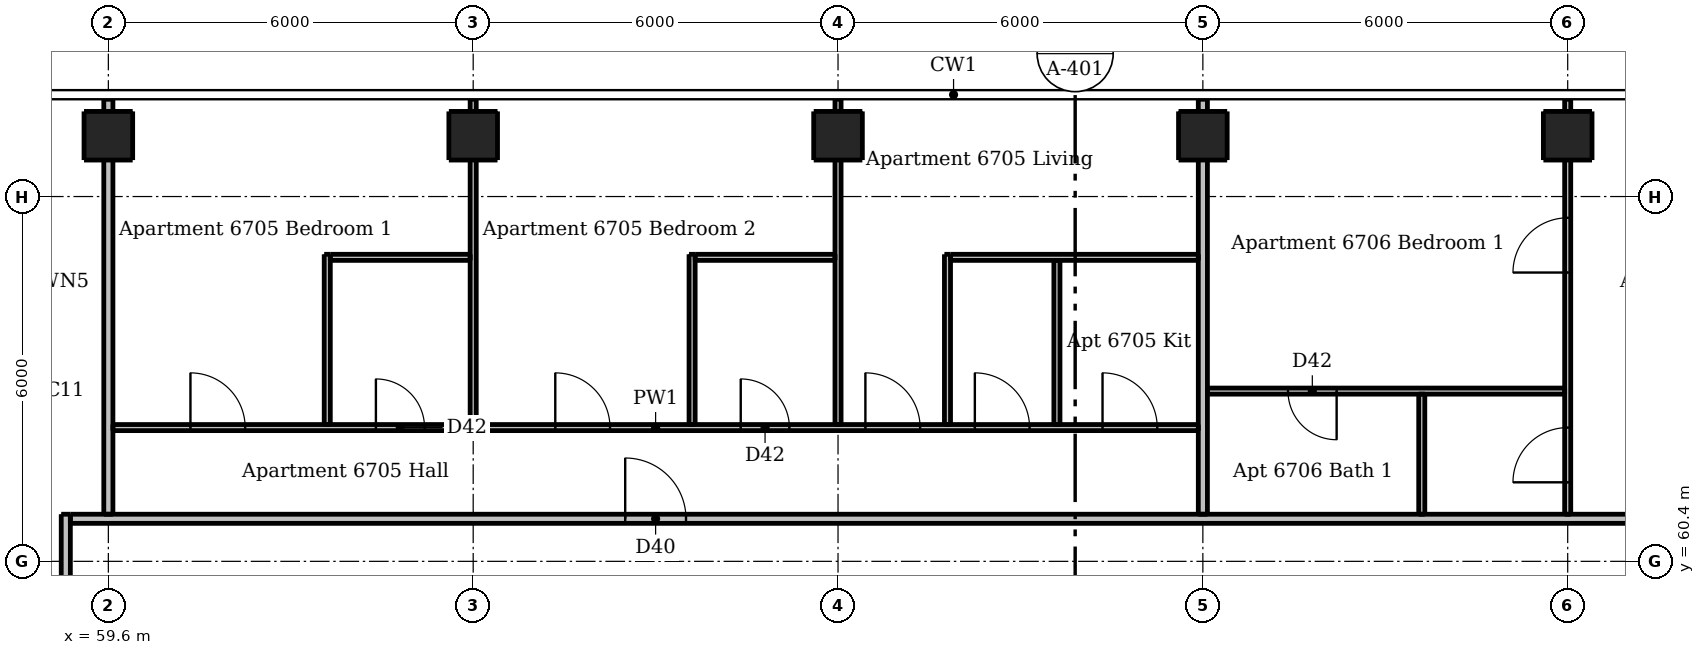
"""IFC4 building model, lengths in metres.
Left out: names, types, materials, properties, quantities, classifications, styles, units other than length and angle.
Written with IfcOpenShell. Run it as: python <this file> out.ifc"""

import sys

from ifc_helpers import new_model, si_unit, direction, frame, frame_2d, origin, origin_2d, place, context, subcontext, project, spatial, rectangle, extrude, element, fill, save


model = new_model("IFC4")
c1 = context("Model", 3, precision=1e-05, world=origin(), true_north=direction((0.0, 1.0)))
c2 = subcontext(c1, "Body", "Model", "MODEL_VIEW")
j1 = project(units=[si_unit("LENGTHUNIT", "METRE"), si_unit("PLANEANGLEUNIT", "RADIAN")], contexts=[c1])
p1 = place(None, origin())
s1 = spatial("IfcSite", under=j1, at=p1, CompositionType="ELEMENT")
p2 = place(p1, origin())
s2 = spatial("IfcBuilding", under=s1, at=p2, CompositionType="ELEMENT")
p3 = place(p2, frame((0.0, 0.0, 252.1)))
s3 = spatial("IfcBuildingStorey", under=s2, at=p3, CompositionType="ELEMENT", Elevation=252.1)
for number, where, z_axis, x_axis in (
    (1, (59.6, 67.4, 0.0), (0.0, 0.0, 1.0), (1.0, 0.0, 0.0)),
    (2, (65.6, 67.4, 0.0), (0.0, 0.0, 1.0), (1.0, 0.0, 0.0)),
    (3, (71.6, 67.4, 0.0), (0.0, 0.0, 1.0), (1.0, 0.0, 0.0)),
    (4, (77.6, 67.4, 0.0), (0.0, 0.0, 1.0), (1.0, 0.0, 0.0)),
    (5, (83.6, 67.4, 0.0), (0.0, 0.0, 1.0), (1.0, 0.0, 0.0)),
):
    element("IfcColumn", number, at=place(p3, frame(where, z_axis=z_axis, x_axis=x_axis)), inside=s3, PredefinedType="COLUMN", context=c2, shape_type="SweptSolid", body=[
        extrude(rectangle(XDim=0.8, YDim=0.8, at=origin_2d()), origin(), (0.0, 0.0, 1.0), 3.05),
    ])
p4 = place(p3, frame((63.2, 62.65, 0.0), z_axis=(0.0, 0.0, 1.0), x_axis=(0.0, 1.0, 0.0)))
e6 = element("IfcWall", 6, at=p4, inside=s3, PredefinedType="PARTITIONING", context=c2, shape_type="SweptSolid", body=[
    extrude(rectangle(XDim=2.8, YDim=0.1, at=frame_2d((1.4, 0.0))), origin(), (0.0, 0.0, 1.0), 3.05),
])
p5 = place(p3, frame((65.6, 62.65, 0.0), z_axis=(0.0, 0.0, 1.0), x_axis=(0.0, 1.0, 0.0)))
e7 = element("IfcWall", 7, at=p5, inside=s3, PredefinedType="PARTITIONING", context=c2, shape_type="SweptSolid", body=[
    extrude(rectangle(XDim=5.35, YDim=0.1, at=frame_2d((2.675, 0.0))), origin(), (0.0, 0.0, 1.0), 2.516),
])
p6 = place(p3, frame((69.2, 62.65, 0.0), z_axis=(0.0, 0.0, 1.0), x_axis=(0.0, 1.0, 0.0)))
e8 = element("IfcWall", 8, at=p6, inside=s3, PredefinedType="PARTITIONING", context=c2, shape_type="SweptSolid", body=[
    extrude(rectangle(XDim=2.8, YDim=0.1, at=frame_2d((1.4, 0.0))), origin(), (0.0, 0.0, 1.0), 3.05),
])
p7 = place(p3, frame((71.6, 62.65, 0.0), z_axis=(0.0, 0.0, 1.0), x_axis=(0.0, 1.0, 0.0)))
e9 = element("IfcWall", 9, at=p7, inside=s3, PredefinedType="PARTITIONING", context=c2, shape_type="SweptSolid", body=[
    extrude(rectangle(XDim=5.35, YDim=0.1, at=frame_2d((2.675, 0.0))), origin(), (0.0, 0.0, 1.0), 2.516),
])
p8 = place(p3, frame((73.4, 62.65, 0.0), z_axis=(0.0, 0.0, 1.0), x_axis=(0.0, 1.0, 0.0)))
e10 = element("IfcWall", 10, at=p8, inside=s3, PredefinedType="PARTITIONING", context=c2, shape_type="SweptSolid", body=[
    extrude(rectangle(XDim=2.8, YDim=0.1, at=frame_2d((1.4, 0.0))), origin(), (0.0, 0.0, 1.0), 3.05),
])
p9 = place(p3, frame((75.2, 62.65, 0.0), z_axis=(0.0, 0.0, 1.0), x_axis=(0.0, 1.0, 0.0)))
e11 = element("IfcWall", 11, at=p9, inside=s3, PredefinedType="PARTITIONING", context=c2, shape_type="SweptSolid", body=[
    extrude(rectangle(XDim=2.7, YDim=0.1, at=frame_2d((1.35, 0.0))), origin(), (0.0, 0.0, 1.0), 3.05),
])
p10 = place(p3, frame((81.2, 61.175, 0.0), z_axis=(0.0, 0.0, 1.0), x_axis=(0.0, 1.0, 0.0)))
e12 = element("IfcWall", 12, at=p10, inside=s3, PredefinedType="PARTITIONING", context=c2, shape_type="SweptSolid", body=[
    extrude(rectangle(XDim=1.975, YDim=0.1, at=frame_2d((0.987, 0.0))), origin(), (0.0, 0.0, 1.0), 3.05),
])
p11 = place(p3, frame((83.6, 61.175, 0.0), z_axis=(0.0, 0.0, 1.0), x_axis=(0.0, 1.0, 0.0)))
e13 = element("IfcWall", 13, at=p11, inside=s3, PredefinedType="PARTITIONING", context=c2, shape_type="SweptSolid", body=[
    extrude(rectangle(XDim=6.825, YDim=0.1, at=frame_2d((3.413, 0.0))), origin(), (0.0, 0.0, 1.0), 2.516),
])
p12 = place(p11, frame((0.525, 0.0, 0.0)))
e14 = element("IfcOpeningElement", 14, at=p12, cuts=e13, PredefinedType="OPENING", context=c2, shape_type="SweptSolid", body=[
    extrude(rectangle(XDim=0.9, YDim=2.1, at=frame_2d((0.45, 1.05))), frame((0.0, 0.06, 0.0), z_axis=(0.0, -1.0, 0.0), x_axis=(1.0, 0.0, 0.0)), (0.0, 0.0, 1.0), 0.12),
])
p13 = place(p11, frame((3.975, 0.0, 0.0)))
e15 = element("IfcOpeningElement", 15, at=p13, cuts=e13, PredefinedType="OPENING", context=c2, shape_type="SweptSolid", body=[
    extrude(rectangle(XDim=0.9, YDim=2.1, at=frame_2d((0.45, 1.05))), frame((0.0, 0.06, 0.0), z_axis=(0.0, -1.0, 0.0), x_axis=(1.0, 0.0, 0.0)), (0.0, 0.0, 1.0), 0.12),
])
for number, where, z_axis, x_axis in (
    (16, (63.25, 65.4, 0.0), (0.0, 0.0, 1.0), (1.0, 0.0, 0.0)),
    (17, (69.25, 65.4, 0.0), (0.0, 0.0, 1.0), (1.0, 0.0, 0.0)),
):
    element("IfcWall", number, at=place(p3, frame(where, z_axis=z_axis, x_axis=x_axis)), inside=s3, PredefinedType="PARTITIONING", context=c2, shape_type="SweptSolid", body=[
        extrude(rectangle(XDim=2.3, YDim=0.1, at=frame_2d((1.15, 0.0))), origin(), (0.0, 0.0, 1.0), 3.05),
    ])
p14 = place(p3, frame((73.45, 65.4, 0.0), z_axis=(0.0, 0.0, 1.0), x_axis=(1.0, 0.0, 0.0)))
e18 = element("IfcWall", 18, at=p14, inside=s3, PredefinedType="PARTITIONING", context=c2, shape_type="SweptSolid", body=[
    extrude(rectangle(XDim=4.075, YDim=0.1, at=frame_2d((2.038, 0.0))), origin(), (0.0, 0.0, 1.0), 3.05),
])
p15 = place(p3, frame((83.55, 63.2, 0.0), z_axis=(0.0, 0.0, 1.0), x_axis=(-1.0, 0.0, 0.0)))
e19 = element("IfcWall", 19, at=p15, inside=s3, PredefinedType="PARTITIONING", context=c2, shape_type="SweptSolid", body=[
    extrude(rectangle(XDim=5.875, YDim=0.1, at=frame_2d((2.938, 0.0))), origin(), (0.0, 0.0, 1.0), 3.05),
])
p16 = place(p15, frame((3.75, 0.0, 0.0)))
e20 = element("IfcOpeningElement", 20, at=p16, cuts=e19, PredefinedType="OPENING", context=c2, shape_type="SweptSolid", body=[
    extrude(rectangle(XDim=0.8, YDim=2.1, at=frame_2d((0.4, 1.05))), frame((0.0, 0.06, 0.0), z_axis=(0.0, -1.0, 0.0), x_axis=(1.0, 0.0, 0.0)), (0.0, 0.0, 1.0), 0.12),
])
p17 = place(p3, frame((59.675, 62.6, 0.0), z_axis=(0.0, 0.0, 1.0), x_axis=(1.0, 0.0, 0.0)))
e21 = element("IfcWall", 21, at=p17, inside=s3, PredefinedType="PARTITIONING", context=c2, shape_type="SweptSolid", body=[
    extrude(rectangle(XDim=17.85, YDim=0.1, at=frame_2d((8.925, 0.0))), origin(), (0.0, 0.0, 1.0), 3.05),
])
p18 = place(p17, frame((12.375, 0.0, 0.0)))
e22 = element("IfcOpeningElement", 22, at=p18, cuts=e21, PredefinedType="OPENING", context=c2, shape_type="SweptSolid", body=[
    extrude(rectangle(XDim=0.9, YDim=2.1, at=frame_2d((0.45, 1.05))), frame((0.0, 0.06, 0.0), z_axis=(0.0, -1.0, 0.0), x_axis=(1.0, 0.0, 0.0)), (0.0, 0.0, 1.0), 0.12),
])
p19 = place(p17, frame((16.275, 0.0, 0.0)))
e23 = element("IfcOpeningElement", 23, at=p19, cuts=e21, PredefinedType="OPENING", context=c2, shape_type="SweptSolid", body=[
    extrude(rectangle(XDim=0.9, YDim=2.1, at=frame_2d((0.45, 1.05))), frame((0.0, 0.06, 0.0), z_axis=(0.0, -1.0, 0.0), x_axis=(1.0, 0.0, 0.0)), (0.0, 0.0, 1.0), 0.12),
])
p20 = place(p17, frame((14.175, 0.0, 0.0)))
e24 = element("IfcOpeningElement", 24, at=p20, cuts=e21, PredefinedType="OPENING", context=c2, shape_type="SweptSolid", body=[
    extrude(rectangle(XDim=0.9, YDim=2.1, at=frame_2d((0.45, 1.05))), frame((0.0, 0.06, 0.0), z_axis=(0.0, -1.0, 0.0), x_axis=(1.0, 0.0, 0.0)), (0.0, 0.0, 1.0), 0.12),
])
p21 = place(p17, frame((1.275, 0.0, 0.0)))
e25 = element("IfcOpeningElement", 25, at=p21, cuts=e21, PredefinedType="OPENING", context=c2, shape_type="SweptSolid", body=[
    extrude(rectangle(XDim=0.9, YDim=2.1, at=frame_2d((0.45, 1.05))), frame((0.0, 0.06, 0.0), z_axis=(0.0, -1.0, 0.0), x_axis=(1.0, 0.0, 0.0)), (0.0, 0.0, 1.0), 0.12),
])
p22 = place(p17, frame((7.275, 0.0, 0.0)))
e26 = element("IfcOpeningElement", 26, at=p22, cuts=e21, PredefinedType="OPENING", context=c2, shape_type="SweptSolid", body=[
    extrude(rectangle(XDim=0.9, YDim=2.1, at=frame_2d((0.45, 1.05))), frame((0.0, 0.06, 0.0), z_axis=(0.0, -1.0, 0.0), x_axis=(1.0, 0.0, 0.0)), (0.0, 0.0, 1.0), 0.12),
])
p23 = place(p17, frame((4.325, 0.0, 0.0)))
e27 = element("IfcOpeningElement", 27, at=p23, cuts=e21, PredefinedType="OPENING", context=c2, shape_type="SweptSolid", body=[
    extrude(rectangle(XDim=0.8, YDim=2.1, at=frame_2d((0.4, 1.05))), frame((0.0, 0.06, 0.0), z_axis=(0.0, -1.0, 0.0), x_axis=(1.0, 0.0, 0.0)), (0.0, 0.0, 1.0), 0.12),
])
p24 = place(p17, frame((10.325, 0.0, 0.0)))
e28 = element("IfcOpeningElement", 28, at=p24, cuts=e21, PredefinedType="OPENING", context=c2, shape_type="SweptSolid", body=[
    extrude(rectangle(XDim=0.8, YDim=2.1, at=frame_2d((0.4, 1.05))), frame((0.0, 0.06, 0.0), z_axis=(0.0, -1.0, 0.0), x_axis=(1.0, 0.0, 0.0)), (0.0, 0.0, 1.0), 0.12),
])
p25 = place(p3, frame((58.9, 30.325, 0.0), z_axis=(0.0, 0.0, 1.0), x_axis=(0.0, 1.0, 0.0)))
e29 = element("IfcWall", 29, at=p25, inside=s3, PredefinedType="PARTITIONING", context=c2, shape_type="SweptSolid", body=[
    extrude(rectangle(XDim=30.85, YDim=0.15, at=frame_2d((15.425, 0.0))), origin(), (0.0, 0.0, 1.0), 3.05),
])
p26 = place(p25, frame((7.375, 0.0, 0.0)))
e30 = element("IfcOpeningElement", 30, at=p26, cuts=e29, PredefinedType="OPENING", context=c2, shape_type="SweptSolid", body=[
    extrude(rectangle(XDim=1.0, YDim=2.1, at=frame_2d((0.5, 1.05))), frame((0.0, 0.085, 0.0), z_axis=(0.0, -1.0, 0.0), x_axis=(1.0, 0.0, 0.0)), (0.0, 0.0, 1.0), 0.17),
])
p27 = place(p25, frame((26.925, 0.0, 0.0)))
e31 = element("IfcOpeningElement", 31, at=p27, cuts=e29, PredefinedType="OPENING", context=c2, shape_type="SweptSolid", body=[
    extrude(rectangle(XDim=1.0, YDim=2.1, at=frame_2d((0.5, 1.05))), frame((0.0, 0.085, 0.0), z_axis=(0.0, -1.0, 0.0), x_axis=(1.0, 0.0, 0.0)), (0.0, 0.0, 1.0), 0.17),
])
p28 = place(p3, frame((59.6, 61.175, 0.0), z_axis=(0.0, 0.0, 1.0), x_axis=(0.0, 1.0, 0.0)))
e32 = element("IfcWall", 32, at=p28, inside=s3, PredefinedType="PARTITIONING", context=c2, shape_type="SweptSolid", body=[
    extrude(rectangle(XDim=6.825, YDim=0.15, at=frame_2d((3.413, 0.0))), origin(), (0.0, 0.0, 1.0), 2.51),
])
p29 = place(p3, frame((77.6, 61.175, 0.0), z_axis=(0.0, 0.0, 1.0), x_axis=(0.0, 1.0, 0.0)))
e33 = element("IfcWall", 33, at=p29, inside=s3, PredefinedType="PARTITIONING", context=c2, shape_type="SweptSolid", body=[
    extrude(rectangle(XDim=6.825, YDim=0.15, at=frame_2d((3.413, 0.0))), origin(), (0.0, 0.0, 1.0), 2.516),
])
p30 = place(p3, frame((58.975, 61.1, 0.0), z_axis=(0.0, 0.0, 1.0), x_axis=(1.0, 0.0, 0.0)))
e34 = element("IfcWall", 34, at=p30, inside=s3, PredefinedType="PARTITIONING", context=c2, shape_type="SweptSolid", body=[
    extrude(rectangle(XDim=29.25, YDim=0.15, at=frame_2d((14.625, 0.0))), origin(), (0.0, 0.0, 1.0), 3.05),
])
p31 = place(p30, frame((9.125, 0.0, 0.0)))
e35 = element("IfcOpeningElement", 35, at=p31, cuts=e34, PredefinedType="OPENING", context=c2, shape_type="SweptSolid", body=[
    extrude(rectangle(XDim=1.0, YDim=2.1, at=frame_2d((0.5, 1.05))), frame((0.0, 0.085, 0.0), z_axis=(0.0, -1.0, 0.0), x_axis=(1.0, 0.0, 0.0)), (0.0, 0.0, 1.0), 0.17),
])
p32 = place(p30, frame((26.475, 0.0, 0.0)))
e36 = element("IfcOpeningElement", 36, at=p32, cuts=e34, PredefinedType="OPENING", context=c2, shape_type="SweptSolid", body=[
    extrude(rectangle(XDim=1.0, YDim=2.1, at=frame_2d((0.5, 1.05))), frame((0.0, 0.085, 0.0), z_axis=(0.0, -1.0, 0.0), x_axis=(1.0, 0.0, 0.0)), (0.0, 0.0, 1.0), 0.17),
])
p33 = place(p31, origin())
e37 = element("IfcDoor", 37, at=p33, inside=s3, OperationType="SINGLE_SWING_LEFT", PredefinedType="DOOR", context=c2, shape_type="SweptSolid", body=[
    extrude(rectangle(XDim=1.0, YDim=2.1, at=frame_2d((0.5, 1.05))), frame((0.0, 0.025, 0.0), z_axis=(0.0, -1.0, 0.0), x_axis=(1.0, 0.0, 0.0)), (0.0, 0.0, 1.0), 0.05),
])
fill(e35, e37)
p34 = place(p18, origin())
e38 = element("IfcDoor", 38, at=p34, inside=s3, OperationType="SINGLE_SWING_LEFT", PredefinedType="DOOR", context=c2, shape_type="SweptSolid", body=[
    extrude(rectangle(XDim=0.9, YDim=2.1, at=frame_2d((0.45, 1.05))), frame((0.0, 0.025, 0.0), z_axis=(0.0, -1.0, 0.0), x_axis=(1.0, 0.0, 0.0)), (0.0, 0.0, 1.0), 0.05),
])
fill(e22, e38)
p35 = place(p19, origin())
e39 = element("IfcDoor", 39, at=p35, inside=s3, OperationType="SINGLE_SWING_LEFT", PredefinedType="DOOR", context=c2, shape_type="SweptSolid", body=[
    extrude(rectangle(XDim=0.9, YDim=2.1, at=frame_2d((0.45, 1.05))), frame((0.0, 0.025, 0.0), z_axis=(0.0, -1.0, 0.0), x_axis=(1.0, 0.0, 0.0)), (0.0, 0.0, 1.0), 0.05),
])
fill(e23, e39)
p36 = place(p20, origin())
e40 = element("IfcDoor", 40, at=p36, inside=s3, OperationType="SINGLE_SWING_LEFT", PredefinedType="DOOR", context=c2, shape_type="SweptSolid", body=[
    extrude(rectangle(XDim=0.9, YDim=2.1, at=frame_2d((0.45, 1.05))), frame((0.0, 0.025, 0.0), z_axis=(0.0, -1.0, 0.0), x_axis=(1.0, 0.0, 0.0)), (0.0, 0.0, 1.0), 0.05),
])
fill(e24, e40)
p37 = place(p21, origin())
e41 = element("IfcDoor", 41, at=p37, inside=s3, OperationType="SINGLE_SWING_LEFT", PredefinedType="DOOR", context=c2, shape_type="SweptSolid", body=[
    extrude(rectangle(XDim=0.9, YDim=2.1, at=frame_2d((0.45, 1.05))), frame((0.0, 0.025, 0.0), z_axis=(0.0, -1.0, 0.0), x_axis=(1.0, 0.0, 0.0)), (0.0, 0.0, 1.0), 0.05),
])
fill(e25, e41)
p38 = place(p22, origin())
e42 = element("IfcDoor", 42, at=p38, inside=s3, OperationType="SINGLE_SWING_LEFT", PredefinedType="DOOR", context=c2, shape_type="SweptSolid", body=[
    extrude(rectangle(XDim=0.9, YDim=2.1, at=frame_2d((0.45, 1.05))), frame((0.0, 0.025, 0.0), z_axis=(0.0, -1.0, 0.0), x_axis=(1.0, 0.0, 0.0)), (0.0, 0.0, 1.0), 0.05),
])
fill(e26, e42)
p39 = place(p23, origin())
e43 = element("IfcDoor", 43, at=p39, inside=s3, OperationType="SINGLE_SWING_LEFT", PredefinedType="DOOR", context=c2, shape_type="SweptSolid", body=[
    extrude(rectangle(XDim=0.8, YDim=2.1, at=frame_2d((0.4, 1.05))), frame((0.0, 0.025, 0.0), z_axis=(0.0, -1.0, 0.0), x_axis=(1.0, 0.0, 0.0)), (0.0, 0.0, 1.0), 0.05),
])
fill(e27, e43)
p40 = place(p24, origin())
e44 = element("IfcDoor", 44, at=p40, inside=s3, OperationType="SINGLE_SWING_LEFT", PredefinedType="DOOR", context=c2, shape_type="SweptSolid", body=[
    extrude(rectangle(XDim=0.8, YDim=2.1, at=frame_2d((0.4, 1.05))), frame((0.0, 0.025, 0.0), z_axis=(0.0, -1.0, 0.0), x_axis=(1.0, 0.0, 0.0)), (0.0, 0.0, 1.0), 0.05),
])
fill(e28, e44)
p41 = place(p12, origin())
e45 = element("IfcDoor", 45, at=p41, inside=s3, OperationType="SINGLE_SWING_LEFT", PredefinedType="DOOR", context=c2, shape_type="SweptSolid", body=[
    extrude(rectangle(XDim=0.9, YDim=2.1, at=frame_2d((0.45, 1.05))), frame((0.0, 0.025, 0.0), z_axis=(0.0, -1.0, 0.0), x_axis=(1.0, 0.0, 0.0)), (0.0, 0.0, 1.0), 0.05),
])
fill(e14, e45)
p42 = place(p13, origin())
e46 = element("IfcDoor", 46, at=p42, inside=s3, OperationType="SINGLE_SWING_LEFT", PredefinedType="DOOR", context=c2, shape_type="SweptSolid", body=[
    extrude(rectangle(XDim=0.9, YDim=2.1, at=frame_2d((0.45, 1.05))), frame((0.0, 0.025, 0.0), z_axis=(0.0, -1.0, 0.0), x_axis=(1.0, 0.0, 0.0)), (0.0, 0.0, 1.0), 0.05),
])
fill(e15, e46)
p43 = place(p16, origin())
e47 = element("IfcDoor", 47, at=p43, inside=s3, OperationType="SINGLE_SWING_LEFT", PredefinedType="DOOR", context=c2, shape_type="SweptSolid", body=[
    extrude(rectangle(XDim=0.8, YDim=2.1, at=frame_2d((0.4, 1.05))), frame((0.0, 0.025, 0.0), z_axis=(0.0, -1.0, 0.0), x_axis=(1.0, 0.0, 0.0)), (0.0, 0.0, 1.0), 0.05),
])
fill(e20, e47)
save(model, sys.argv[1])
